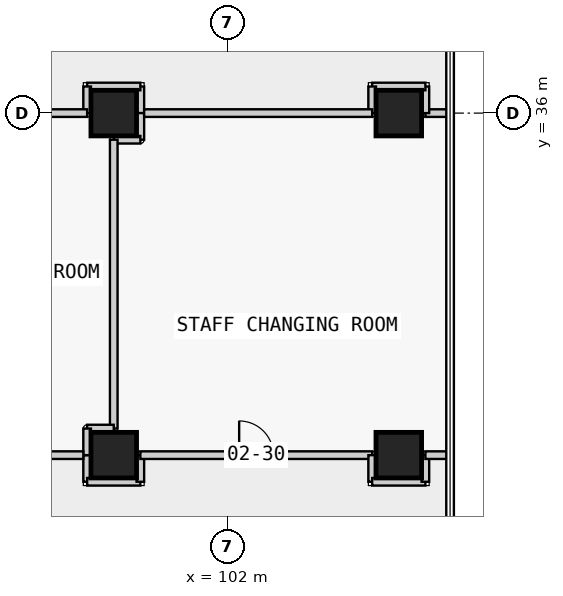
"""IFC4 building model, lengths in metres.
Left out: names, types, materials, properties, quantities, classifications, styles, units other than length and angle.
Written with IfcOpenShell. Run it as: python <this file> out.ifc"""

import sys

from ifc_helpers import new_model, si_unit, direction, frame, frame_2d, origin, origin_2d, place, context, subcontext, project, spatial, rectangle, extrude, element, fill, save


model = new_model("IFC4")
c1 = context("Model", 3, precision=1e-05, world=origin(), true_north=direction((0.0, 1.0)))
c2 = subcontext(c1, "Body", "Model", "MODEL_VIEW")
j1 = project(units=[si_unit("LENGTHUNIT", "METRE"), si_unit("PLANEANGLEUNIT", "RADIAN")], contexts=[c1])
p1 = place(None, origin())
s1 = spatial("IfcSite", under=j1, at=p1, CompositionType="ELEMENT")
p2 = place(p1, origin())
s2 = spatial("IfcBuilding", under=s1, at=p2, CompositionType="ELEMENT")
p3 = place(p2, frame((0.0, 0.0, 12.8)))
s3 = spatial("IfcBuildingStorey", under=s2, at=p3, CompositionType="ELEMENT", Elevation=12.8)
for number, where, z_axis, x_axis in (
    (1, (99.0, 27.0, 0.0), (0.0, 0.0, 1.0), (1.0, 0.0, 0.0)),
    (2, (99.0, 36.0, 0.0), (0.0, 0.0, 1.0), (1.0, 0.0, 0.0)),
    (3, (106.5, 27.0, 0.0), (0.0, 0.0, 1.0), (1.0, 0.0, 0.0)),
    (4, (106.5, 36.0, 0.0), (0.0, 0.0, 1.0), (1.0, 0.0, 0.0)),
):
    element("IfcColumn", number, at=place(p3, frame(where, z_axis=z_axis, x_axis=x_axis)), inside=s3, PredefinedType="COLUMN", context=c2, shape_type="SweptSolid", body=[
        extrude(rectangle(XDim=1.2, YDim=1.2, at=origin_2d()), origin(), (0.0, 0.0, 1.0), 4.5),
    ])
p4 = place(p3, frame((98.3, 27.0, 0.0), z_axis=(0.0, 0.0, 1.0), x_axis=(0.0, -1.0, 0.0)))
e5 = element("IfcWall", 5, at=p4, inside=s3, PredefinedType="PARTITIONING", context=c2, shape_type="SweptSolid", body=[
    extrude(rectangle(XDim=0.7, YDim=0.2, at=frame_2d((0.35, 0.0))), origin(), (0.0, 0.0, 1.0), 3.45),
])
p5 = place(p3, frame((98.3, 26.3, 0.0), z_axis=(0.0, 0.0, 1.0), x_axis=(1.0, 0.0, 0.0)))
e6 = element("IfcWall", 6, at=p5, inside=s3, PredefinedType="PARTITIONING", context=c2, shape_type="SweptSolid", body=[
    extrude(rectangle(XDim=1.4, YDim=0.2, at=frame_2d((0.7, 0.0))), origin(), (0.0, 0.0, 1.0), 4.15),
])
p6 = place(p3, frame((99.7, 26.3, 0.0), z_axis=(0.0, 0.0, 1.0), x_axis=(0.0, 1.0, 0.0)))
e7 = element("IfcWall", 7, at=p6, inside=s3, PredefinedType="PARTITIONING", context=c2, shape_type="SweptSolid", body=[
    extrude(rectangle(XDim=0.7, YDim=0.2, at=frame_2d((0.35, 0.0))), origin(), (0.0, 0.0, 1.0), 3.45),
])
p7 = place(p3, frame((99.7, 27.0, 0.0), z_axis=(0.0, 0.0, 1.0), x_axis=(1.0, 0.0, 0.0)))
e8 = element("IfcWall", 8, at=p7, inside=s3, PredefinedType="PARTITIONING", context=c2, shape_type="SweptSolid", body=[
    extrude(rectangle(XDim=6.1, YDim=0.2, at=frame_2d((3.05, 0.0))), origin(), (0.0, 0.0, 1.0), 3.45),
])
p8 = place(p7, frame((2.6, 0.0, 0.0)))
e9 = element("IfcOpeningElement", 9, at=p8, cuts=e8, PredefinedType="OPENING", context=c2, shape_type="SweptSolid", body=[
    extrude(rectangle(XDim=0.9, YDim=2.1, at=frame_2d((0.45, 1.05))), frame((0.0, 0.11, 0.0), z_axis=(0.0, -1.0, 0.0), x_axis=(1.0, 0.0, 0.0)), (0.0, 0.0, 1.0), 0.22),
])
p9 = place(p3, frame((105.8, 27.0, 0.0), z_axis=(0.0, 0.0, 1.0), x_axis=(0.0, -1.0, 0.0)))
e10 = element("IfcWall", 10, at=p9, inside=s3, PredefinedType="PARTITIONING", context=c2, shape_type="SweptSolid", body=[
    extrude(rectangle(XDim=0.7, YDim=0.2, at=frame_2d((0.35, 0.0))), origin(), (0.0, 0.0, 1.0), 3.45),
])
p10 = place(p3, frame((105.8, 26.3, 0.0), z_axis=(0.0, 0.0, 1.0), x_axis=(1.0, 0.0, 0.0)))
e11 = element("IfcWall", 11, at=p10, inside=s3, PredefinedType="PARTITIONING", context=c2, shape_type="SweptSolid", body=[
    extrude(rectangle(XDim=1.4, YDim=0.2, at=frame_2d((0.7, 0.0))), origin(), (0.0, 0.0, 1.0), 3.45),
])
p11 = place(p3, frame((107.2, 26.3, 0.0), z_axis=(0.0, 0.0, 1.0), x_axis=(0.0, 1.0, 0.0)))
e12 = element("IfcWall", 12, at=p11, inside=s3, PredefinedType="PARTITIONING", context=c2, shape_type="SweptSolid", body=[
    extrude(rectangle(XDim=0.7, YDim=0.2, at=frame_2d((0.35, 0.0))), origin(), (0.0, 0.0, 1.0), 4.15),
])
p12 = place(p3, frame((107.2, 27.0, 0.0), z_axis=(0.0, 0.0, 1.0), x_axis=(1.0, 0.0, 0.0)))
e13 = element("IfcWall", 13, at=p12, inside=s3, PredefinedType="PARTITIONING", context=c2, shape_type="SweptSolid", body=[
    extrude(rectangle(XDim=0.65, YDim=0.2, at=frame_2d((0.325, 0.0))), origin(), (0.0, 0.0, 1.0), 4.15),
])
p13 = place(p3, frame((99.7, 36.0, 0.0), z_axis=(0.0, 0.0, 1.0), x_axis=(0.0, 1.0, 0.0)))
e14 = element("IfcWall", 14, at=p13, inside=s3, PredefinedType="PARTITIONING", context=c2, shape_type="SweptSolid", body=[
    extrude(rectangle(XDim=0.7, YDim=0.2, at=frame_2d((0.35, 0.0))), origin(), (0.0, 0.0, 1.0), 3.45),
])
p14 = place(p3, frame((99.7, 36.7, 0.0), z_axis=(0.0, 0.0, 1.0), x_axis=(-1.0, 0.0, 0.0)))
e15 = element("IfcWall", 15, at=p14, inside=s3, PredefinedType="PARTITIONING", context=c2, shape_type="SweptSolid", body=[
    extrude(rectangle(XDim=1.4, YDim=0.2, at=frame_2d((0.7, 0.0))), origin(), (0.0, 0.0, 1.0), 3.45),
])
p15 = place(p3, frame((98.3, 36.7, 0.0), z_axis=(0.0, 0.0, 1.0), x_axis=(0.0, -1.0, 0.0)))
e16 = element("IfcWall", 16, at=p15, inside=s3, PredefinedType="PARTITIONING", context=c2, shape_type="SweptSolid", body=[
    extrude(rectangle(XDim=0.7, YDim=0.2, at=frame_2d((0.35, 0.0))), origin(), (0.0, 0.0, 1.0), 3.45),
])
p16 = place(p3, frame((98.3, 36.0, 0.0), z_axis=(0.0, 0.0, 1.0), x_axis=(-1.0, 0.0, 0.0)))
e17 = element("IfcWall", 17, at=p16, inside=s3, PredefinedType="PARTITIONING", context=c2, shape_type="SweptSolid", body=[
    extrude(rectangle(XDim=7.6, YDim=0.2, at=frame_2d((3.8, 0.0))), origin(), (0.0, 0.0, 1.0), 3.45),
])
p17 = place(p16, frame((3.1, 0.0, 0.0)))
e18 = element("IfcOpeningElement", 18, at=p17, cuts=e17, PredefinedType="OPENING", context=c2, shape_type="SweptSolid", body=[
    extrude(rectangle(XDim=1.4, YDim=2.1, at=frame_2d((0.7, 1.05))), frame((0.0, 0.11, 0.0), z_axis=(0.0, -1.0, 0.0), x_axis=(1.0, 0.0, 0.0)), (0.0, 0.0, 1.0), 0.22),
])
for number, where, z_axis, x_axis in (
    (19, (99.7, 36.0, 0.0), (0.0, 0.0, 1.0), (0.0, -1.0, 0.0)),
    (20, (99.7, 35.3, 0.0), (0.0, 0.0, 1.0), (-1.0, 0.0, 0.0)),
):
    element("IfcWall", number, at=place(p3, frame(where, z_axis=z_axis, x_axis=x_axis)), inside=s3, PredefinedType="PARTITIONING", context=c2, shape_type="SweptSolid", body=[
        extrude(rectangle(XDim=0.7, YDim=0.2, at=frame_2d((0.35, 0.0))), origin(), (0.0, 0.0, 1.0), 3.45),
    ])
p18 = place(p3, frame((99.0, 35.3, 0.0), z_axis=(0.0, 0.0, 1.0), x_axis=(0.0, -1.0, 0.0)))
e21 = element("IfcWall", 21, at=p18, inside=s3, PredefinedType="PARTITIONING", context=c2, shape_type="SweptSolid", body=[
    extrude(rectangle(XDim=7.6, YDim=0.2, at=frame_2d((3.8, 0.0))), origin(), (0.0, 0.0, 1.0), 3.45),
])
for number, where, z_axis, x_axis in (
    (22, (99.0, 27.7, 0.0), (0.0, 0.0, 1.0), (-1.0, 0.0, 0.0)),
    (23, (98.3, 27.7, 0.0), (0.0, 0.0, 1.0), (0.0, -1.0, 0.0)),
):
    element("IfcWall", number, at=place(p3, frame(where, z_axis=z_axis, x_axis=x_axis)), inside=s3, PredefinedType="PARTITIONING", context=c2, shape_type="SweptSolid", body=[
        extrude(rectangle(XDim=0.7, YDim=0.2, at=frame_2d((0.35, 0.0))), origin(), (0.0, 0.0, 1.0), 3.45),
    ])
p19 = place(p3, frame((107.85, 36.0, 0.0), z_axis=(0.0, 0.0, 1.0), x_axis=(-1.0, 0.0, 0.0)))
e24 = element("IfcWall", 24, at=p19, inside=s3, PredefinedType="PARTITIONING", context=c2, shape_type="SweptSolid", body=[
    extrude(rectangle(XDim=0.65, YDim=0.2, at=frame_2d((0.325, 0.0))), origin(), (0.0, 0.0, 1.0), 4.15),
])
p20 = place(p3, frame((107.2, 36.0, 0.0), z_axis=(0.0, 0.0, 1.0), x_axis=(0.0, 1.0, 0.0)))
e25 = element("IfcWall", 25, at=p20, inside=s3, PredefinedType="PARTITIONING", context=c2, shape_type="SweptSolid", body=[
    extrude(rectangle(XDim=0.7, YDim=0.2, at=frame_2d((0.35, 0.0))), origin(), (0.0, 0.0, 1.0), 4.15),
])
p21 = place(p3, frame((107.2, 36.7, 0.0), z_axis=(0.0, 0.0, 1.0), x_axis=(-1.0, 0.0, 0.0)))
e26 = element("IfcWall", 26, at=p21, inside=s3, PredefinedType="PARTITIONING", context=c2, shape_type="SweptSolid", body=[
    extrude(rectangle(XDim=1.4, YDim=0.2, at=frame_2d((0.7, 0.0))), origin(), (0.0, 0.0, 1.0), 3.45),
])
p22 = place(p3, frame((105.8, 36.7, 0.0), z_axis=(0.0, 0.0, 1.0), x_axis=(0.0, -1.0, 0.0)))
e27 = element("IfcWall", 27, at=p22, inside=s3, PredefinedType="PARTITIONING", context=c2, shape_type="SweptSolid", body=[
    extrude(rectangle(XDim=0.7, YDim=0.2, at=frame_2d((0.35, 0.0))), origin(), (0.0, 0.0, 1.0), 3.45),
])
p23 = place(p3, frame((105.8, 36.0, 0.0), z_axis=(0.0, 0.0, 1.0), x_axis=(-1.0, 0.0, 0.0)))
e28 = element("IfcWall", 28, at=p23, inside=s3, PredefinedType="PARTITIONING", context=c2, shape_type="SweptSolid", body=[
    extrude(rectangle(XDim=6.0, YDim=0.2, at=frame_2d((3.0, 0.0))), origin(), (0.0, 0.0, 1.0), 3.45),
])
p24 = place(p3, frame((90.7, 27.0, 0.0), z_axis=(0.0, 0.0, 1.0), x_axis=(1.0, 0.0, 0.0)))
e29 = element("IfcWall", 29, at=p24, inside=s3, PredefinedType="PARTITIONING", context=c2, shape_type="SweptSolid", body=[
    extrude(rectangle(XDim=7.5, YDim=0.2, at=frame_2d((3.75, 0.0))), origin(), (0.0, 0.0, 1.0), 3.45),
])
p25 = place(p8, origin())
e30 = element("IfcDoor", 30, at=p25, inside=s3, OperationType="SINGLE_SWING_LEFT", PredefinedType="DOOR", context=c2, shape_type="SweptSolid", body=[
    extrude(rectangle(XDim=0.9, YDim=2.1, at=frame_2d((0.45, 1.05))), frame((0.0, 0.025, 0.0), z_axis=(0.0, -1.0, 0.0), x_axis=(1.0, 0.0, 0.0)), (0.0, 0.0, 1.0), 0.05),
])
fill(e9, e30)
save(model, sys.argv[1])
